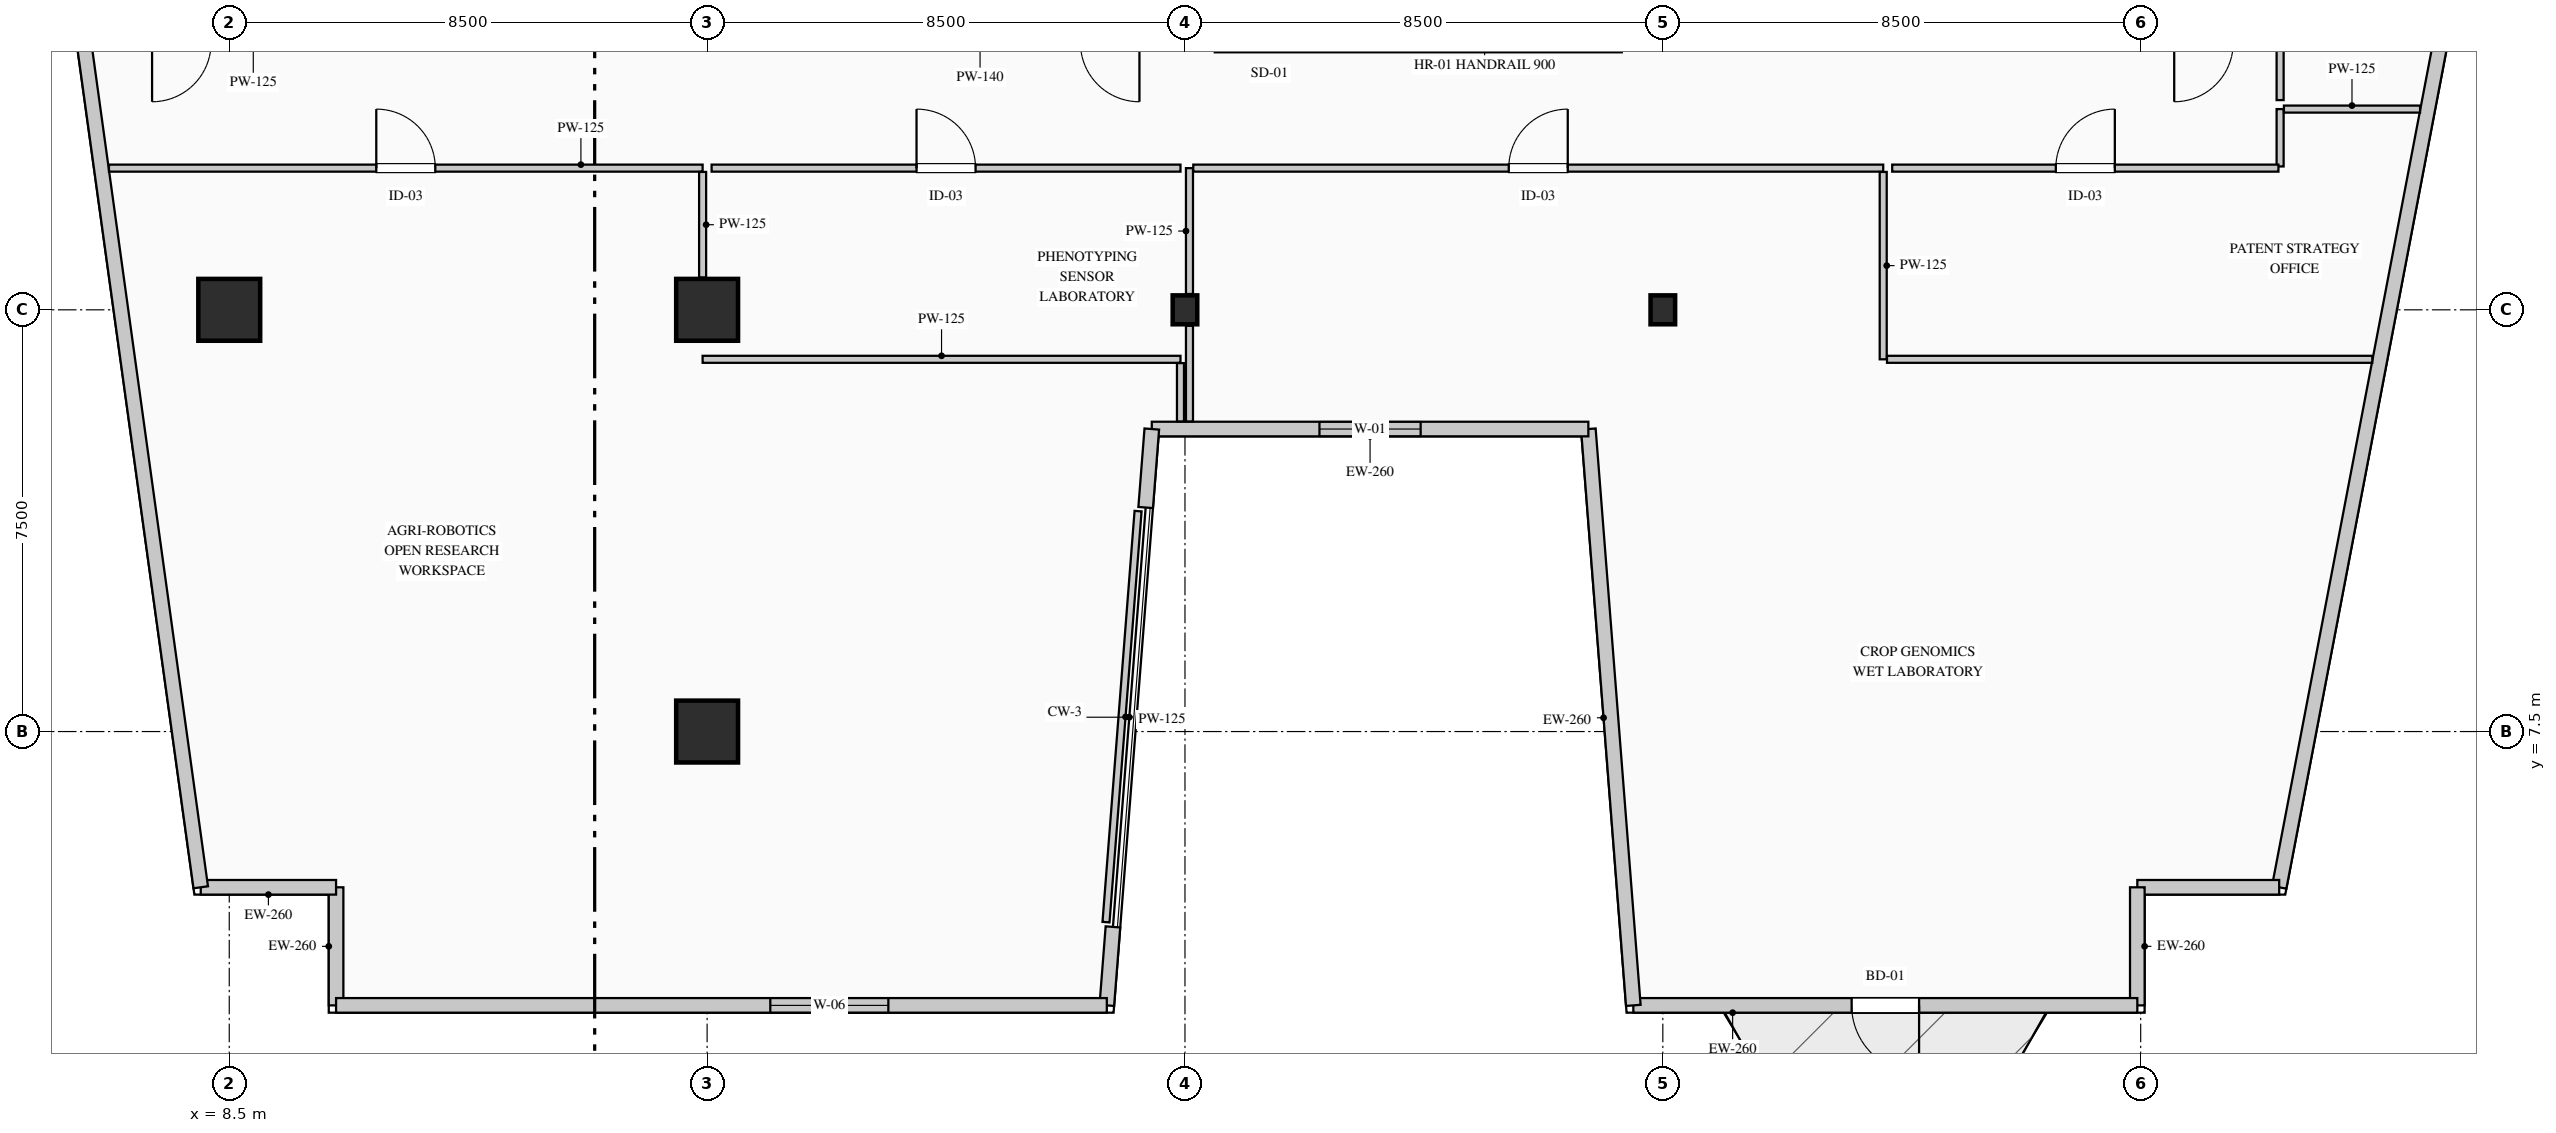
"""IFC4 building model, lengths in metres.
Left out: names, types, materials, properties, quantities, classifications, styles, units other than length and angle.
Written with IfcOpenShell. Run it as: python <this file> out.ifc"""

import sys

from ifc_helpers import new_model, si_unit, direction, frame, frame_2d, origin, origin_2d, place, context, subcontext, project, spatial, rectangle, i_section, extrude, element, fill, save


model = new_model("IFC4")
c1 = context("Model", 3, precision=1e-05, world=origin(), true_north=direction((0.0, 1.0)))
c2 = subcontext(c1, "Body", "Model", "MODEL_VIEW")
j1 = project(units=[si_unit("LENGTHUNIT", "METRE"), si_unit("PLANEANGLEUNIT", "RADIAN")], contexts=[c1])
p1 = place(None, origin())
s1 = spatial("IfcSite", under=j1, at=p1, CompositionType="ELEMENT")
p2 = place(p1, origin())
s2 = spatial("IfcBuilding", under=s1, at=p2, CompositionType="ELEMENT")
p3 = place(p2, frame((0.0, 0.0, 115.35)))
s3 = spatial("IfcBuildingStorey", under=s2, at=p3, CompositionType="ELEMENT", Elevation=115.35)
for number, where, z_axis, x_axis in (
    (1, (8.5, 15.0, 0.0), (0.0, 0.0, 1.0), (1.0, 0.0, 0.0)),
    (2, (17.0, 7.5, 0.0), (0.0, 0.0, 1.0), (1.0, 0.0, 0.0)),
    (3, (17.0, 15.0, 0.0), (0.0, 0.0, 1.0), (1.0, 0.0, 0.0)),
):
    element("IfcColumn", number, at=place(p3, frame(where, z_axis=z_axis, x_axis=x_axis)), inside=s3, PredefinedType="COLUMN", context=c2, shape_type="SweptSolid", body=[
        extrude(rectangle(XDim=1.1, YDim=1.1, at=origin_2d()), origin(), (0.0, 0.0, 1.0), 3.95),
    ])
for number, where, z_axis, x_axis in (
    (4, (25.5, 15.0, 0.0), (0.0, 0.0, 1.0), (1.0, 0.0, 0.0)),
    (5, (34.0, 15.0, 0.0), (0.0, 0.0, 1.0), (1.0, 0.0, 0.0)),
):
    element("IfcColumn", number, at=place(p3, frame(where, z_axis=z_axis, x_axis=x_axis)), inside=s3, PredefinedType="COLUMN", context=c2, shape_type="SweptSolid", body=[
        extrude(i_section(OverallWidth=0.437, OverallDepth=0.514, WebThickness=0.061, FlangeThickness=0.077, FilletRadius=0.015, at=origin_2d()), origin(), (0.0, 0.0, 1.0), 3.95),
    ])
p4 = place(p3, frame((10.4, 2.63, 0.0), z_axis=(0.0, 0.0, 1.0), x_axis=(0.0, 1.0, 0.0)))
e6 = element("IfcWall", 6, at=p4, inside=s3, PredefinedType="STANDARD", context=c2, shape_type="SweptSolid", body=[
    extrude(rectangle(XDim=2.1, YDim=0.26, at=frame_2d((1.05, 0.0))), origin(), (0.0, 0.0, 1.0), 3.69),
])
p5 = place(p3, frame((10.4, 4.73, 0.0), z_axis=(0.0, 0.0, 1.0), x_axis=(-1.0, 0.0, 0.0)))
e7 = element("IfcWall", 7, at=p5, inside=s3, PredefinedType="STANDARD", context=c2, shape_type="SweptSolid", body=[
    extrude(rectangle(XDim=2.407, YDim=0.26, at=frame_2d((1.204, 0.0))), origin(), (0.0, 0.0, 1.0), 3.69),
])
p6 = place(p3, frame((7.993, 4.73, 0.0), z_axis=(0.0, 0.0, 1.0), x_axis=(-0.136989009016, 0.990572567462, 0.0)))
e8 = element("IfcWall", 8, at=p6, inside=s3, PredefinedType="STANDARD", context=c2, shape_type="SweptSolid", body=[
    extrude(rectangle(XDim=36.888, YDim=0.26, at=frame_2d((18.444, 0.0))), origin(), (0.0, 0.0, 1.0), 3.69),
])
p7 = place(p6, frame((19.839, 0.0, 0.9)))
e9 = element("IfcOpeningElement", 9, at=p7, cuts=e8, PredefinedType="OPENING", context=c2, shape_type="SweptSolid", body=[
    extrude(rectangle(XDim=2.1, YDim=2.0, at=frame_2d((1.05, 1.0))), frame((0.0, 0.14, 0.0), z_axis=(0.0, -1.0, 0.0), x_axis=(1.0, 0.0, 0.0)), (0.0, 0.0, 1.0), 0.28),
])
p8 = place(p3, frame((51.942, 41.27, 0.0), z_axis=(0.0, 0.0, 1.0), x_axis=(-0.187592192405, -0.982247000173, 0.0)))
e10 = element("IfcWall", 10, at=p8, inside=s3, PredefinedType="STANDARD", context=c2, shape_type="SweptSolid", body=[
    extrude(rectangle(XDim=37.2, YDim=0.26, at=frame_2d((18.6, 0.0))), origin(), (0.0, 0.0, 1.0), 3.69),
])
p9 = place(p8, frame((12.342, 0.0, 0.9)))
e11 = element("IfcOpeningElement", 11, at=p9, cuts=e10, PredefinedType="OPENING", context=c2, shape_type="SweptSolid", body=[
    extrude(rectangle(XDim=2.1, YDim=2.0, at=frame_2d((1.05, 1.0))), frame((0.0, 0.14, 0.0), z_axis=(0.0, -1.0, 0.0), x_axis=(1.0, 0.0, 0.0)), (0.0, 0.0, 1.0), 0.28),
])
p10 = place(p3, frame((44.963, 4.73, 0.0), z_axis=(0.0, 0.0, 1.0), x_axis=(-1.0, 0.0, 0.0)))
e12 = element("IfcWall", 12, at=p10, inside=s3, PredefinedType="STANDARD", context=c2, shape_type="SweptSolid", body=[
    extrude(rectangle(XDim=2.523, YDim=0.26, at=frame_2d((1.262, 0.0))), origin(), (0.0, 0.0, 1.0), 3.69),
])
p11 = place(p3, frame((42.44, 4.73, 0.0), z_axis=(0.0, 0.0, 1.0), x_axis=(0.0, -1.0, 0.0)))
e13 = element("IfcWall", 13, at=p11, inside=s3, PredefinedType="STANDARD", context=c2, shape_type="SweptSolid", body=[
    extrude(rectangle(XDim=2.1, YDim=0.26, at=frame_2d((1.05, 0.0))), origin(), (0.0, 0.0, 1.0), 3.69),
])
p12 = place(p3, frame((42.44, 2.63, 0.0), z_axis=(0.0, 0.0, 1.0), x_axis=(-1.0, 0.0, 0.0)))
e14 = element("IfcWall", 14, at=p12, inside=s3, PredefinedType="STANDARD", context=c2, shape_type="SweptSolid", body=[
    extrude(rectangle(XDim=8.965, YDim=0.26, at=frame_2d((4.482, 0.0))), origin(), (0.0, 0.0, 1.0), 3.69),
])
p13 = place(p12, frame((3.882, 0.0, 0.0)))
e15 = element("IfcOpeningElement", 15, at=p13, cuts=e14, PredefinedType="OPENING", context=c2, shape_type="SweptSolid", body=[
    extrude(rectangle(XDim=1.2, YDim=2.2, at=frame_2d((0.6, 1.1))), frame((0.0, 0.14, 0.0), z_axis=(0.0, -1.0, 0.0), x_axis=(1.0, 0.0, 0.0)), (0.0, 0.0, 1.0), 0.28),
])
p14 = place(p3, frame((33.475, 2.63, 0.0), z_axis=(0.0, 0.0, 1.0), x_axis=(-0.077793257511, 0.996969512616, 0.0)))
e16 = element("IfcWall", 16, at=p14, inside=s3, PredefinedType="STANDARD", context=c2, shape_type="SweptSolid", body=[
    extrude(rectangle(XDim=10.281, YDim=0.26, at=frame_2d((5.141, 0.0))), origin(), (0.0, 0.0, 1.0), 3.69),
])
p15 = place(p3, frame((32.675, 12.88, 0.0), z_axis=(0.0, 0.0, 1.0), x_axis=(-1.0, 0.0, 0.0)))
e17 = element("IfcWall", 17, at=p15, inside=s3, PredefinedType="STANDARD", context=c2, shape_type="SweptSolid", body=[
    extrude(rectangle(XDim=7.765, YDim=0.26, at=frame_2d((3.883, 0.0))), origin(), (0.0, 0.0, 1.0), 3.69),
])
p16 = place(p15, frame((2.983, 0.0, 0.9)))
e18 = element("IfcOpeningElement", 18, at=p16, cuts=e17, PredefinedType="OPENING", context=c2, shape_type="SweptSolid", body=[
    extrude(rectangle(XDim=1.8, YDim=2.1, at=frame_2d((0.9, 1.05))), frame((0.0, 0.14, 0.0), z_axis=(0.0, -1.0, 0.0), x_axis=(1.0, 0.0, 0.0)), (0.0, 0.0, 1.0), 0.28),
])
for number, where, z_axis, x_axis in (
    (19, (24.91, 12.88, 0.0), (0.0, 0.0, 1.0), (-0.078, -0.997, 0.0)),
    (20, (24.219, 4.026, 0.0), (0.0, 0.0, 1.0), (-0.078, -0.997, 0.0)),
):
    element("IfcWall", number, at=place(p3, frame(where, z_axis=z_axis, x_axis=x_axis)), inside=s3, PredefinedType="STANDARD", context=c2, shape_type="SweptSolid", body=[
        extrude(rectangle(XDim=1.4, YDim=0.26, at=frame_2d((0.7, 0.0))), origin(), (0.0, 0.0, 1.0), 3.69),
    ])
p17 = place(p3, frame((24.11, 2.63, 0.0), z_axis=(0.0, 0.0, 1.0), x_axis=(-1.0, 0.0, 0.0)))
e21 = element("IfcWall", 21, at=p17, inside=s3, PredefinedType="STANDARD", context=c2, shape_type="SweptSolid", body=[
    extrude(rectangle(XDim=13.71, YDim=0.26, at=frame_2d((6.855, 0.0))), origin(), (0.0, 0.0, 1.0), 3.69),
])
p18 = place(p17, frame((3.886, 0.0, 0.9)))
e22 = element("IfcOpeningElement", 22, at=p18, cuts=e21, PredefinedType="OPENING", context=c2, shape_type="SweptSolid", body=[
    extrude(rectangle(XDim=2.1, YDim=2.0, at=frame_2d((1.05, 1.0))), frame((0.0, 0.14, 0.0), z_axis=(0.0, -1.0, 0.0), x_axis=(1.0, 0.0, 0.0)), (0.0, 0.0, 1.0), 0.28),
])
p19 = place(p3, frame((6.36, 17.52, 0.0), z_axis=(0.0, 0.0, 1.0), x_axis=(1.0, 0.0, 0.0)))
e23 = element("IfcWall", 23, at=p19, inside=s3, PredefinedType="PARTITIONING", context=c2, shape_type="SweptSolid", body=[
    extrude(rectangle(XDim=10.56, YDim=0.125, at=frame_2d((5.28, 0.0))), origin(), (0.0, 0.0, 1.0), 3.69),
])
p20 = place(p19, frame((4.755, 0.0, 0.0)))
e24 = element("IfcOpeningElement", 24, at=p20, cuts=e23, PredefinedType="OPENING", context=c2, shape_type="SweptSolid", body=[
    extrude(rectangle(XDim=1.05, YDim=2.15, at=frame_2d((0.525, 1.075))), frame((0.0, 0.073, 0.0), z_axis=(0.0, -1.0, 0.0), x_axis=(1.0, 0.0, 0.0)), (0.0, 0.0, 1.0), 0.145),
])
p21 = place(p3, frame((16.92, 17.452, 0.0), z_axis=(0.0, 0.0, 1.0), x_axis=(0.0, -1.0, 0.0)))
e25 = element("IfcWall", 25, at=p21, inside=s3, PredefinedType="PARTITIONING", context=c2, shape_type="SweptSolid", body=[
    extrude(rectangle(XDim=1.877, YDim=0.125, at=frame_2d((0.939, 0.0))), origin(), (0.0, 0.0, 1.0), 3.69),
])
p22 = place(p3, frame((16.92, 14.12, 0.0), z_axis=(0.0, 0.0, 1.0), x_axis=(1.0, 0.0, 0.0)))
e26 = element("IfcWall", 26, at=p22, inside=s3, PredefinedType="PARTITIONING", context=c2, shape_type="SweptSolid", body=[
    extrude(rectangle(XDim=8.5, YDim=0.125, at=frame_2d((4.25, 0.0))), origin(), (0.0, 0.0, 1.0), 3.69),
])
p23 = place(p3, frame((25.42, 14.052, 0.0), z_axis=(0.0, 0.0, 1.0), x_axis=(0.0, -1.0, 0.0)))
e27 = element("IfcWall", 27, at=p23, inside=s3, PredefinedType="PARTITIONING", context=c2, shape_type="SweptSolid", body=[
    extrude(rectangle(XDim=1.038, YDim=0.125, at=frame_2d((0.519, 0.0))), origin(), (0.0, 0.0, 1.0), 3.69),
])
p24 = place(p3, frame((24.666, 11.42, 0.0), z_axis=(0.0, 0.0, 1.0), x_axis=(-0.077816821526, -0.996967673642, 0.0)))
e28 = element("IfcWall", 28, at=p24, inside=s3, PredefinedType="PARTITIONING", context=c2, shape_type="SweptSolid", body=[
    extrude(rectangle(XDim=7.332, YDim=0.125, at=frame_2d((3.666, 0.0))), origin(), (0.0, 0.0, 1.0), 3.69),
])
p25 = place(p3, frame((25.58, 13.015, 0.0), z_axis=(0.0, 0.0, 1.0), x_axis=(0.0, 1.0, 0.0)))
e29 = element("IfcWall", 29, at=p25, inside=s3, PredefinedType="PARTITIONING", context=c2, shape_type="SweptSolid", body=[
    extrude(rectangle(XDim=1.703, YDim=0.125, at=frame_2d((0.852, 0.0))), origin(), (0.0, 0.0, 1.0), 3.69),
])
p26 = place(p3, frame((25.58, 15.282, 0.0), z_axis=(0.0, 0.0, 1.0), x_axis=(0.0, 1.0, 0.0)))
e30 = element("IfcWall", 30, at=p26, inside=s3, PredefinedType="PARTITIONING", context=c2, shape_type="SweptSolid", body=[
    extrude(rectangle(XDim=2.238, YDim=0.125, at=frame_2d((1.119, 0.0))), origin(), (0.0, 0.0, 1.0), 2.875),
])
p27 = place(p3, frame((25.647, 17.52, 0.0), z_axis=(0.0, 0.0, 1.0), x_axis=(1.0, 0.0, 0.0)))
e31 = element("IfcWall", 31, at=p27, inside=s3, PredefinedType="PARTITIONING", context=c2, shape_type="SweptSolid", body=[
    extrude(rectangle(XDim=12.272, YDim=0.125, at=frame_2d((6.136, 0.0))), origin(), (0.0, 0.0, 1.0), 3.475),
])
p28 = place(p27, frame((5.611, 0.0, 0.0)))
e32 = element("IfcOpeningElement", 32, at=p28, cuts=e31, PredefinedType="OPENING", context=c2, shape_type="SweptSolid", body=[
    extrude(rectangle(XDim=1.05, YDim=2.15, at=frame_2d((0.525, 1.075))), frame((0.0, 0.073, 0.0), z_axis=(0.0, -1.0, 0.0), x_axis=(1.0, 0.0, 0.0)), (0.0, 0.0, 1.0), 0.145),
])
p29 = place(p3, frame((37.92, 17.452, 0.0), z_axis=(0.0, 0.0, 1.0), x_axis=(0.0, -1.0, 0.0)))
e33 = element("IfcWall", 33, at=p29, inside=s3, PredefinedType="PARTITIONING", context=c2, shape_type="SweptSolid", body=[
    extrude(rectangle(XDim=3.332, YDim=0.125, at=frame_2d((1.666, 0.0))), origin(), (0.0, 0.0, 1.0), 3.69),
])
p30 = place(p3, frame((37.988, 14.12, 0.0), z_axis=(0.0, 0.0, 1.0), x_axis=(1.0, 0.0, 0.0)))
e34 = element("IfcWall", 34, at=p30, inside=s3, PredefinedType="PARTITIONING", context=c2, shape_type="SweptSolid", body=[
    extrude(rectangle(XDim=8.632, YDim=0.125, at=frame_2d((4.316, 0.0))), origin(), (0.0, 0.0, 1.0), 3.69),
])
p31 = place(p3, frame((17.08, 17.52, 0.0), z_axis=(0.0, 0.0, 1.0), x_axis=(1.0, 0.0, 0.0)))
e35 = element("IfcWall", 35, at=p31, inside=s3, PredefinedType="PARTITIONING", context=c2, shape_type="SweptSolid", body=[
    extrude(rectangle(XDim=8.34, YDim=0.125, at=frame_2d((4.17, 0.0))), origin(), (0.0, 0.0, 1.0), 3.69),
])
p32 = place(p31, frame((3.645, 0.0, 0.0)))
e36 = element("IfcOpeningElement", 36, at=p32, cuts=e35, PredefinedType="OPENING", context=c2, shape_type="SweptSolid", body=[
    extrude(rectangle(XDim=1.05, YDim=2.15, at=frame_2d((0.525, 1.075))), frame((0.0, 0.073, 0.0), z_axis=(0.0, -1.0, 0.0), x_axis=(1.0, 0.0, 0.0)), (0.0, 0.0, 1.0), 0.145),
])
p33 = place(p3, frame((44.98, 17.55, 0.0), z_axis=(0.0, 0.0, 1.0), x_axis=(0.0, 1.0, 0.0)))
e37 = element("IfcWall", 37, at=p33, inside=s3, PredefinedType="PARTITIONING", context=c2, shape_type="SweptSolid", body=[
    extrude(rectangle(XDim=1.02, YDim=0.125, at=frame_2d((0.51, 0.0))), origin(), (0.0, 0.0, 1.0), 3.69),
])
p34 = place(p3, frame((45.048, 18.57, 0.0), z_axis=(0.0, 0.0, 1.0), x_axis=(1.0, 0.0, 0.0)))
e38 = element("IfcWall", 38, at=p34, inside=s3, PredefinedType="PARTITIONING", context=c2, shape_type="SweptSolid", body=[
    extrude(rectangle(XDim=2.422, YDim=0.125, at=frame_2d((1.211, 0.0))), origin(), (0.0, 0.0, 1.0), 3.69),
])
p35 = place(p3, frame((38.08, 17.52, 0.0), z_axis=(0.0, 0.0, 1.0), x_axis=(1.0, 0.0, 0.0)))
e39 = element("IfcWall", 39, at=p35, inside=s3, PredefinedType="PARTITIONING", context=c2, shape_type="SweptSolid", body=[
    extrude(rectangle(XDim=6.87, YDim=0.125, at=frame_2d((3.435, 0.0))), origin(), (0.0, 0.0, 1.0), 3.69),
])
p36 = place(p35, frame((2.91, 0.0, 0.0)))
e40 = element("IfcOpeningElement", 40, at=p36, cuts=e39, PredefinedType="OPENING", context=c2, shape_type="SweptSolid", body=[
    extrude(rectangle(XDim=1.05, YDim=2.15, at=frame_2d((0.525, 1.075))), frame((0.0, 0.073, 0.0), z_axis=(0.0, -1.0, 0.0), x_axis=(1.0, 0.0, 0.0)), (0.0, 0.0, 1.0), 0.145),
])
p37 = place(p3, frame((44.98, 18.73, 0.0), z_axis=(0.0, 0.0, 1.0), x_axis=(0.0, 1.0, 0.0)))
e41 = element("IfcWall", 41, at=p37, inside=s3, PredefinedType="PARTITIONING", context=c2, shape_type="SweptSolid", body=[
    extrude(rectangle(XDim=1.02, YDim=0.125, at=frame_2d((0.51, 0.0))), origin(), (0.0, 0.0, 1.0), 3.69),
])
p38 = place(p13, origin())
e42 = element("IfcDoor", 42, at=p38, inside=s3, OperationType="SINGLE_SWING_LEFT", PredefinedType="DOOR", context=c2, shape_type="SweptSolid", body=[
    extrude(rectangle(XDim=1.2, YDim=2.2, at=frame_2d((0.6, 1.1))), frame((0.0, 0.025, 0.0), z_axis=(0.0, -1.0, 0.0), x_axis=(1.0, 0.0, 0.0)), (0.0, 0.0, 1.0), 0.05),
])
fill(e15, e42)
p39 = place(p16, origin())
e43 = element("IfcWindow", 43, at=p39, inside=s3, PartitioningType="SINGLE_PANEL", PredefinedType="WINDOW", context=c2, shape_type="SweptSolid", body=[
    extrude(rectangle(XDim=1.8, YDim=2.1, at=frame_2d((0.9, 1.05))), frame((0.0, 0.03, 0.0), z_axis=(0.0, -1.0, 0.0), x_axis=(1.0, 0.0, 0.0)), (0.0, 0.0, 1.0), 0.06),
])
fill(e18, e43)
p40 = place(p18, origin())
e44 = element("IfcWindow", 44, at=p40, inside=s3, PartitioningType="DOUBLE_PANEL_VERTICAL", PredefinedType="WINDOW", context=c2, shape_type="SweptSolid", body=[
    extrude(rectangle(XDim=2.1, YDim=2.0, at=frame_2d((1.05, 1.0))), frame((0.0, 0.03, 0.0), z_axis=(0.0, -1.0, 0.0), x_axis=(1.0, 0.0, 0.0)), (0.0, 0.0, 1.0), 0.06),
])
fill(e22, e44)
p41 = place(p20, origin())
e45 = element("IfcDoor", 45, at=p41, inside=s3, OperationType="SINGLE_SWING_LEFT", PredefinedType="DOOR", context=c2, shape_type="SweptSolid", body=[
    extrude(rectangle(XDim=1.05, YDim=2.15, at=frame_2d((0.525, 1.075))), frame((0.0, 0.025, 0.0), z_axis=(0.0, -1.0, 0.0), x_axis=(1.0, 0.0, 0.0)), (0.0, 0.0, 1.0), 0.05),
])
fill(e24, e45)
p42 = place(p28, origin())
e46 = element("IfcDoor", 46, at=p42, inside=s3, OperationType="SINGLE_SWING_RIGHT", PredefinedType="DOOR", context=c2, shape_type="SweptSolid", body=[
    extrude(rectangle(XDim=1.05, YDim=2.15, at=frame_2d((0.525, 1.075))), frame((0.0, 0.025, 0.0), z_axis=(0.0, -1.0, 0.0), x_axis=(1.0, 0.0, 0.0)), (0.0, 0.0, 1.0), 0.05),
])
fill(e32, e46)
p43 = place(p32, origin())
e47 = element("IfcDoor", 47, at=p43, inside=s3, OperationType="SINGLE_SWING_LEFT", PredefinedType="DOOR", context=c2, shape_type="SweptSolid", body=[
    extrude(rectangle(XDim=1.05, YDim=2.15, at=frame_2d((0.525, 1.075))), frame((0.0, 0.025, 0.0), z_axis=(0.0, -1.0, 0.0), x_axis=(1.0, 0.0, 0.0)), (0.0, 0.0, 1.0), 0.05),
])
fill(e36, e47)
p44 = place(p36, origin())
e48 = element("IfcDoor", 48, at=p44, inside=s3, OperationType="SINGLE_SWING_RIGHT", PredefinedType="DOOR", context=c2, shape_type="SweptSolid", body=[
    extrude(rectangle(XDim=1.05, YDim=2.15, at=frame_2d((0.525, 1.075))), frame((0.0, 0.025, 0.0), z_axis=(0.0, -1.0, 0.0), x_axis=(1.0, 0.0, 0.0)), (0.0, 0.0, 1.0), 0.05),
])
fill(e40, e48)
save(model, sys.argv[1])
